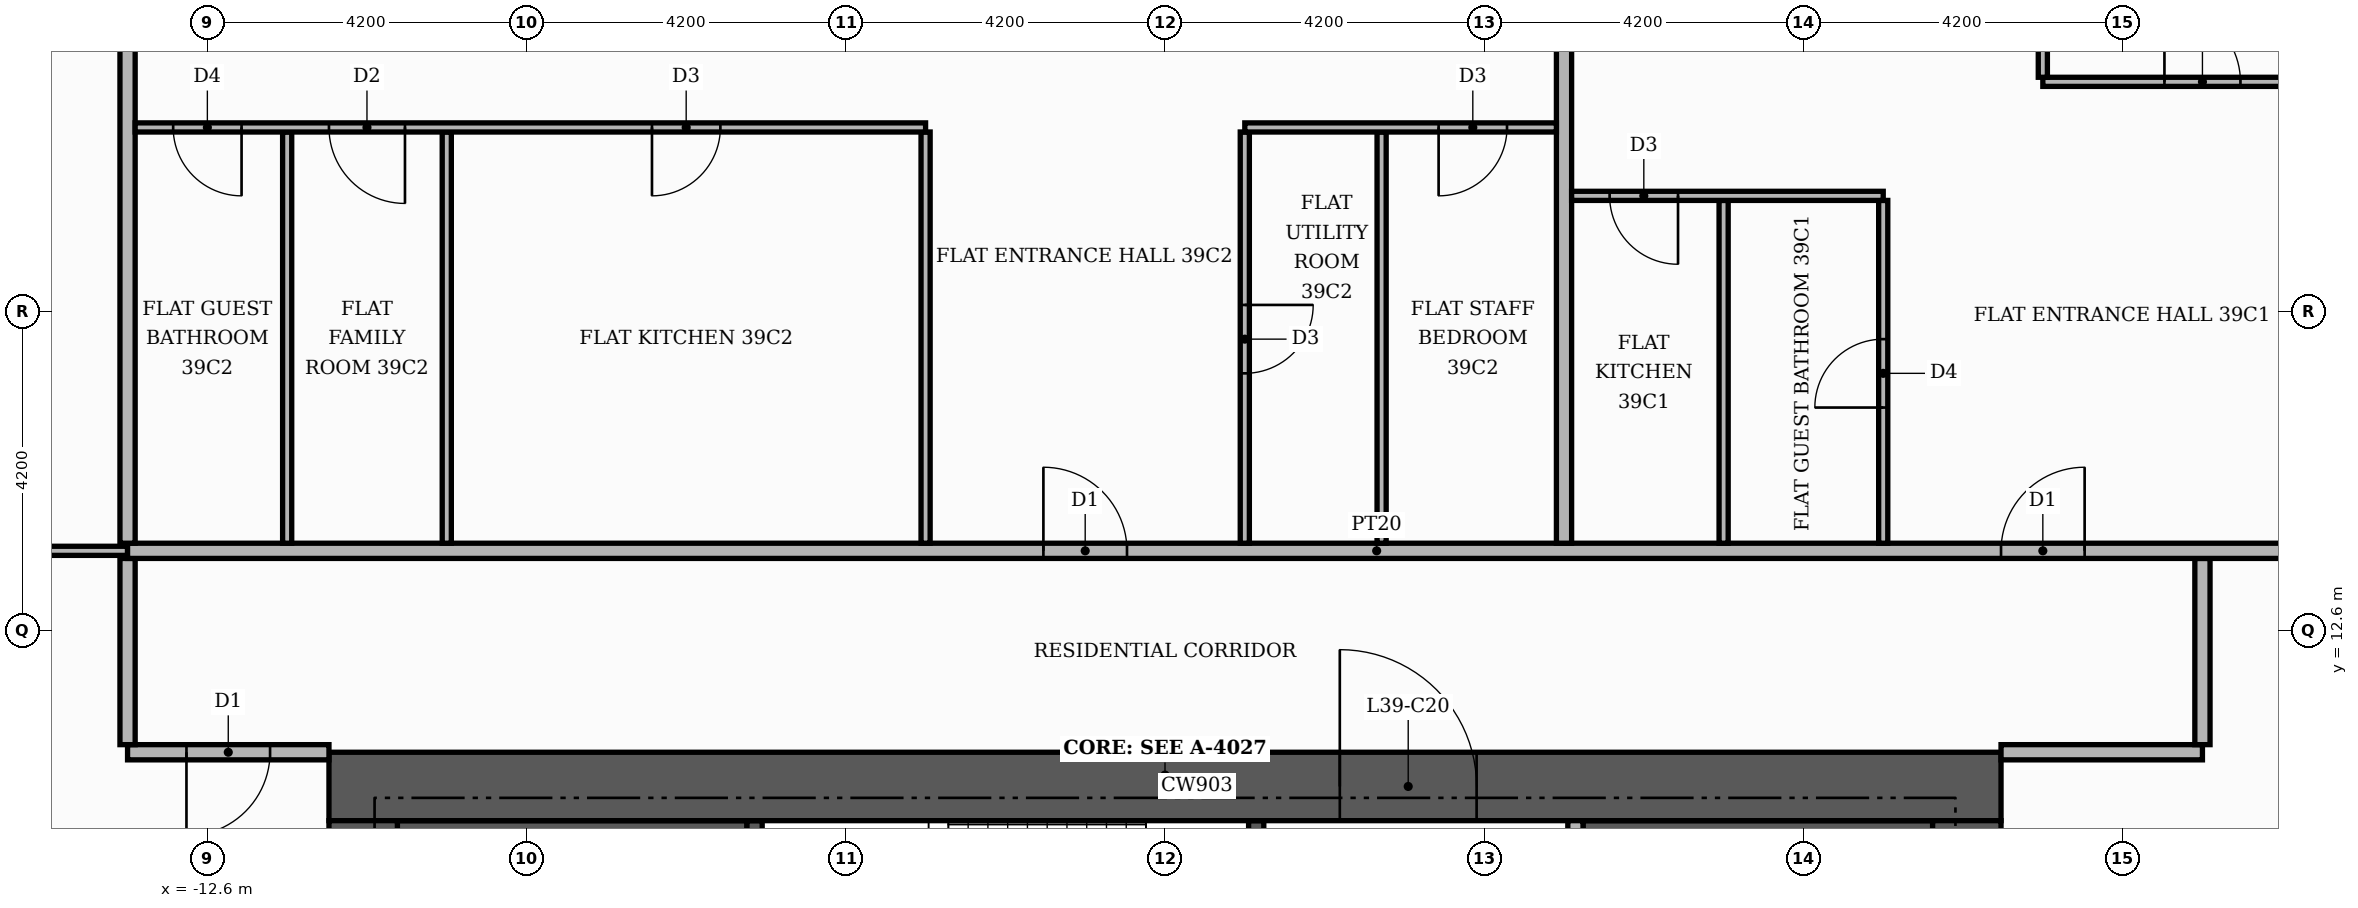
"""IFC4 building model, lengths in metres.
Left out: names, types, materials, properties, quantities, classifications, styles, units other than length and angle.
Written with IfcOpenShell. Run it as: python <this file> out.ifc"""

import sys

from ifc_helpers import new_model, si_unit, direction, frame, frame_2d, origin, place, context, subcontext, project, spatial, rectangle, extrude, element, fill, save


model = new_model("IFC4")
c1 = context("Model", 3, precision=1e-05, world=origin(), true_north=direction((0.0, 1.0)))
c2 = subcontext(c1, "Body", "Model", "MODEL_VIEW")
j1 = project(units=[si_unit("LENGTHUNIT", "METRE"), si_unit("PLANEANGLEUNIT", "RADIAN")], contexts=[c1])
p1 = place(None, origin())
s1 = spatial("IfcSite", under=j1, at=p1, CompositionType="ELEMENT")
p2 = place(p1, origin())
s2 = spatial("IfcBuilding", under=s1, at=p2, CompositionType="ELEMENT")
p3 = place(p2, frame((0.0, 0.0, 165.0)))
s3 = spatial("IfcBuildingStorey", under=s2, at=p3, CompositionType="ELEMENT", Elevation=165.0)
for number, where, z_axis, x_axis in (
    (1, (-10.1, 9.15, 0.0), (0.0, 0.0, 1.0), (1.0, 0.0, 0.0)),
    (2, (5.5, 9.15, 0.0), (0.0, 0.0, 1.0), (1.0, 0.0, 0.0)),
):
    element("IfcWall", number, at=place(p3, frame(where, z_axis=z_axis, x_axis=x_axis)), inside=s3, PredefinedType="SHEAR", context=c2, shape_type="SweptSolid", body=[
        extrude(rectangle(XDim=4.6, YDim=1.9, at=frame_2d((2.3, 0.0))), origin(), (0.0, 0.0, 1.0), 3.48),
    ])
p4 = place(p3, frame((-5.4, 7.25, 0.0), z_axis=(0.0, 0.0, 1.0), x_axis=(0.0, 1.0, 0.0)))
e3 = element("IfcWall", 3, at=p4, inside=s3, PredefinedType="SHEAR", context=c2, shape_type="SweptSolid", body=[
    extrude(rectangle(XDim=2.85, YDim=0.2, at=frame_2d((1.425, 0.0))), origin(), (0.0, 0.0, 1.0), 3.48),
])
p5 = place(p3, frame((1.2, 7.25, 0.0), z_axis=(0.0, 0.0, 1.0), x_axis=(0.0, 1.0, 0.0)))
e4 = element("IfcWall", 4, at=p5, inside=s3, PredefinedType="SHEAR", context=c2, shape_type="SweptSolid", body=[
    extrude(rectangle(XDim=2.85, YDim=0.2, at=frame_2d((1.425, 0.0))), origin(), (0.0, 0.0, 1.0), 3.48),
])
p6 = place(p5, frame((0.85, 0.0, 0.0)))
e5 = element("IfcOpeningElement", 5, at=p6, cuts=e4, PredefinedType="OPENING", context=c2, shape_type="SweptSolid", body=[
    extrude(rectangle(XDim=1.0, YDim=2.1, at=frame_2d((0.5, 1.05))), frame((0.0, 0.11, 0.0), z_axis=(0.0, -1.0, 0.0), x_axis=(1.0, 0.0, 0.0)), (0.0, 0.0, 1.0), 0.22),
])
p7 = place(p3, frame((-11.0, 10.55, 0.0), z_axis=(0.0, 0.0, 1.0), x_axis=(1.0, 0.0, 0.0)))
e6 = element("IfcWall", 6, at=p7, inside=s3, PredefinedType="SHEAR", context=c2, shape_type="SweptSolid", body=[
    extrude(rectangle(XDim=22.0, YDim=0.9, at=frame_2d((11.0, 0.0))), origin(), (0.0, 0.0, 1.0), 3.48),
])
p8 = place(p7, frame((13.3, 0.0, 0.0)))
e7 = element("IfcOpeningElement", 7, at=p8, cuts=e6, PredefinedType="OPENING", context=c2, shape_type="SweptSolid", body=[
    extrude(rectangle(XDim=1.8, YDim=2.2, at=frame_2d((0.9, 1.1))), frame((0.0, 0.46, 0.0), z_axis=(0.0, -1.0, 0.0), x_axis=(1.0, 0.0, 0.0)), (0.0, 0.0, 1.0), 0.92),
])
for number, where, z_axis, x_axis in (
    (8, (-10.55, -10.1, 0.0), (0.0, 0.0, 1.0), (0.0, 1.0, 0.0)),
    (9, (10.55, -10.1, 0.0), (0.0, 0.0, 1.0), (0.0, 1.0, 0.0)),
):
    element("IfcWall", number, at=place(p3, frame(where, z_axis=z_axis, x_axis=x_axis)), inside=s3, PredefinedType="SHEAR", context=c2, shape_type="SweptSolid", body=[
        extrude(rectangle(XDim=20.2, YDim=0.9, at=frame_2d((10.1, 0.0))), origin(), (0.0, 0.0, 1.0), 3.48),
    ])
p9 = place(p3, frame((5.4, 5.5, 0.0), z_axis=(0.0, 0.0, 1.0), x_axis=(0.0, 1.0, 0.0)))
e10 = element("IfcWall", 10, at=p9, inside=s3, PredefinedType="PARTITIONING", context=c2, shape_type="SweptSolid", body=[
    extrude(rectangle(XDim=4.6, YDim=0.2, at=frame_2d((2.3, 0.0))), origin(), (0.0, 0.0, 1.0), 3.48),
])
p10 = place(p9, frame((0.25, 0.0, 0.0)))
e11 = element("IfcOpeningElement", 11, at=p10, cuts=e10, PredefinedType="OPENING", context=c2, shape_type="SweptSolid", body=[
    extrude(rectangle(XDim=1.0, YDim=2.1, at=frame_2d((0.5, 1.05))), frame((0.0, 0.11, 0.0), z_axis=(0.0, -1.0, 0.0), x_axis=(1.0, 0.0, 0.0)), (0.0, 0.0, 1.0), 0.22),
])
p11 = place(p3, frame((-13.65, 11.0, 0.0), z_axis=(0.0, 0.0, 1.0), x_axis=(1.0, 0.0, 0.0)))
e12 = element("IfcWall", 12, at=p11, inside=s3, PredefinedType="PARTITIONING", context=c2, shape_type="SweptSolid", body=[
    extrude(rectangle(XDim=2.65, YDim=0.2, at=frame_2d((1.325, 0.0))), origin(), (0.0, 0.0, 1.0), 3.48),
])
p12 = place(p11, frame((0.775, 0.0, 0.0)))
e13 = element("IfcOpeningElement", 13, at=p12, cuts=e12, PredefinedType="OPENING", context=c2, shape_type="SweptSolid", body=[
    extrude(rectangle(XDim=1.1, YDim=2.4, at=frame_2d((0.55, 1.2))), frame((0.0, 0.11, 0.0), z_axis=(0.0, -1.0, 0.0), x_axis=(1.0, 0.0, 0.0)), (0.0, 0.0, 1.0), 0.22),
])
p13 = place(p3, frame((11.0, 11.0, 0.0), z_axis=(0.0, 0.0, 1.0), x_axis=(1.0, 0.0, 0.0)))
e14 = element("IfcWall", 14, at=p13, inside=s3, PredefinedType="PARTITIONING", context=c2, shape_type="SweptSolid", body=[
    extrude(rectangle(XDim=2.65, YDim=0.2, at=frame_2d((1.325, 0.0))), origin(), (0.0, 0.0, 1.0), 3.48),
])
for number, where, z_axis, x_axis in (
    (15, (-13.65, 11.1, 0.0), (0.0, 0.0, 1.0), (0.0, 1.0, 0.0)),
    (16, (13.65, 11.1, 0.0), (0.0, 0.0, 1.0), (0.0, 1.0, 0.0)),
):
    element("IfcWall", number, at=place(p3, frame(where, z_axis=z_axis, x_axis=x_axis)), inside=s3, PredefinedType="PARTITIONING", context=c2, shape_type="SweptSolid", body=[
        extrude(rectangle(XDim=2.45, YDim=0.2, at=frame_2d((1.225, 0.0))), origin(), (0.0, 0.0, 1.0), 3.48),
    ])
p14 = place(p3, frame((-19.82, 13.65, 0.0), z_axis=(0.0, 0.0, 1.0), x_axis=(1.0, 0.0, 0.0)))
e17 = element("IfcWall", 17, at=p14, inside=s3, PredefinedType="PARTITIONING", context=c2, shape_type="SweptSolid", body=[
    extrude(rectangle(XDim=6.17, YDim=0.12, at=frame_2d((3.085, 0.0))), origin(), (0.0, 0.0, 1.0), 3.48),
])
p15 = place(p14, frame((2.635, 0.0, 0.0)))
e18 = element("IfcOpeningElement", 18, at=p15, cuts=e17, PredefinedType="OPENING", context=c2, shape_type="SweptSolid", body=[
    extrude(rectangle(XDim=0.9, YDim=2.1, at=frame_2d((0.45, 1.05))), frame((0.0, 0.07, 0.0), z_axis=(0.0, -1.0, 0.0), x_axis=(1.0, 0.0, 0.0)), (0.0, 0.0, 1.0), 0.14),
])
p16 = place(p3, frame((-13.65, 13.65, 0.0), z_axis=(0.0, 0.0, 1.0), x_axis=(1.0, 0.0, 0.0)))
e19 = element("IfcWall", 19, at=p16, inside=s3, PredefinedType="PARTITIONING", context=c2, shape_type="SweptSolid", body=[
    extrude(rectangle(XDim=32.87, YDim=0.2, at=frame_2d((16.435, 0.0))), origin(), (0.0, 0.0, 1.0), 3.48),
])
p17 = place(p16, frame((24.65, 0.0, 0.0)))
e20 = element("IfcOpeningElement", 20, at=p17, cuts=e19, PredefinedType="OPENING", context=c2, shape_type="SweptSolid", body=[
    extrude(rectangle(XDim=1.1, YDim=2.4, at=frame_2d((0.55, 1.2))), frame((0.0, 0.11, 0.0), z_axis=(0.0, -1.0, 0.0), x_axis=(1.0, 0.0, 0.0)), (0.0, 0.0, 1.0), 0.22),
])
p18 = place(p16, frame((12.05, 0.0, 0.0)))
e21 = element("IfcOpeningElement", 21, at=p18, cuts=e19, PredefinedType="OPENING", context=c2, shape_type="SweptSolid", body=[
    extrude(rectangle(XDim=1.1, YDim=2.4, at=frame_2d((0.55, 1.2))), frame((0.0, 0.11, 0.0), z_axis=(0.0, -1.0, 0.0), x_axis=(1.0, 0.0, 0.0)), (0.0, 0.0, 1.0), 0.22),
])
p19 = place(p3, frame((-13.65, 13.75, 0.0), z_axis=(0.0, 0.0, 1.0), x_axis=(0.0, 1.0, 0.0)))
e22 = element("IfcWall", 22, at=p19, inside=s3, PredefinedType="PARTITIONING", context=c2, shape_type="SweptSolid", body=[
    extrude(rectangle(XDim=11.67, YDim=0.2, at=frame_2d((5.835, 0.0))), origin(), (0.0, 0.0, 1.0), 3.48),
])
for number, where, z_axis, x_axis in (
    (23, (-11.55, 13.75, 0.0), (0.0, 0.0, 1.0), (0.0, 1.0, 0.0)),
    (24, (-9.45, 13.75, 0.0), (0.0, 0.0, 1.0), (0.0, 1.0, 0.0)),
    (25, (-3.15, 13.75, 0.0), (0.0, 0.0, 1.0), (0.0, 1.0, 0.0)),
):
    element("IfcWall", number, at=place(p3, frame(where, z_axis=z_axis, x_axis=x_axis)), inside=s3, PredefinedType="PARTITIONING", context=c2, shape_type="SweptSolid", body=[
        extrude(rectangle(XDim=5.41, YDim=0.12, at=frame_2d((2.705, 0.0))), origin(), (0.0, 0.0, 1.0), 3.48),
    ])
p20 = place(p3, frame((1.05, 13.75, 0.0), z_axis=(0.0, 0.0, 1.0), x_axis=(0.0, 1.0, 0.0)))
e26 = element("IfcWall", 26, at=p20, inside=s3, PredefinedType="PARTITIONING", context=c2, shape_type="SweptSolid", body=[
    extrude(rectangle(XDim=5.41, YDim=0.12, at=frame_2d((2.705, 0.0))), origin(), (0.0, 0.0, 1.0), 3.48),
])
p21 = place(p20, frame((2.235, 0.0, 0.0)))
e27 = element("IfcOpeningElement", 27, at=p21, cuts=e26, PredefinedType="OPENING", context=c2, shape_type="SweptSolid", body=[
    extrude(rectangle(XDim=0.9, YDim=2.1, at=frame_2d((0.45, 1.05))), frame((0.0, 0.07, 0.0), z_axis=(0.0, -1.0, 0.0), x_axis=(1.0, 0.0, 0.0)), (0.0, 0.0, 1.0), 0.14),
])
p22 = place(p3, frame((2.85, 13.75, 0.0), z_axis=(0.0, 0.0, 1.0), x_axis=(0.0, 1.0, 0.0)))
e28 = element("IfcWall", 28, at=p22, inside=s3, PredefinedType="PARTITIONING", context=c2, shape_type="SweptSolid", body=[
    extrude(rectangle(XDim=5.41, YDim=0.12, at=frame_2d((2.705, 0.0))), origin(), (0.0, 0.0, 1.0), 3.48),
])
p23 = place(p3, frame((5.25, 13.75, 0.0), z_axis=(0.0, 0.0, 1.0), x_axis=(0.0, 1.0, 0.0)))
e29 = element("IfcWall", 29, at=p23, inside=s3, PredefinedType="PARTITIONING", context=c2, shape_type="SweptSolid", body=[
    extrude(rectangle(XDim=6.67, YDim=0.2, at=frame_2d((3.335, 0.0))), origin(), (0.0, 0.0, 1.0), 3.48),
])
p24 = place(p3, frame((7.35, 13.75, 0.0), z_axis=(0.0, 0.0, 1.0), x_axis=(0.0, 1.0, 0.0)))
e30 = element("IfcWall", 30, at=p24, inside=s3, PredefinedType="PARTITIONING", context=c2, shape_type="SweptSolid", body=[
    extrude(rectangle(XDim=4.51, YDim=0.12, at=frame_2d((2.255, 0.0))), origin(), (0.0, 0.0, 1.0), 3.48),
])
p25 = place(p3, frame((9.45, 13.75, 0.0), z_axis=(0.0, 0.0, 1.0), x_axis=(0.0, 1.0, 0.0)))
e31 = element("IfcWall", 31, at=p25, inside=s3, PredefinedType="PARTITIONING", context=c2, shape_type="SweptSolid", body=[
    extrude(rectangle(XDim=4.51, YDim=0.12, at=frame_2d((2.255, 0.0))), origin(), (0.0, 0.0, 1.0), 3.48),
])
p26 = place(p25, frame((1.785, 0.0, 0.0)))
e32 = element("IfcOpeningElement", 32, at=p26, cuts=e31, PredefinedType="OPENING", context=c2, shape_type="SweptSolid", body=[
    extrude(rectangle(XDim=0.9, YDim=2.1, at=frame_2d((0.45, 1.05))), frame((0.0, 0.07, 0.0), z_axis=(0.0, -1.0, 0.0), x_axis=(1.0, 0.0, 0.0)), (0.0, 0.0, 1.0), 0.14),
])
p27 = place(p3, frame((5.35, 18.32, 0.0), z_axis=(0.0, 0.0, 1.0), x_axis=(1.0, 0.0, 0.0)))
e33 = element("IfcWall", 33, at=p27, inside=s3, PredefinedType="PARTITIONING", context=c2, shape_type="SweptSolid", body=[
    extrude(rectangle(XDim=4.1, YDim=0.12, at=frame_2d((2.05, 0.0))), origin(), (0.0, 0.0, 1.0), 3.48),
])
p28 = place(p27, frame((0.5, 0.0, 0.0)))
e34 = element("IfcOpeningElement", 34, at=p28, cuts=e33, PredefinedType="OPENING", context=c2, shape_type="SweptSolid", body=[
    extrude(rectangle(XDim=0.9, YDim=2.1, at=frame_2d((0.45, 1.05))), frame((0.0, 0.07, 0.0), z_axis=(0.0, -1.0, 0.0), x_axis=(1.0, 0.0, 0.0)), (0.0, 0.0, 1.0), 0.14),
])
p29 = place(p3, frame((-13.55, 19.22, 0.0), z_axis=(0.0, 0.0, 1.0), x_axis=(1.0, 0.0, 0.0)))
e35 = element("IfcWall", 35, at=p29, inside=s3, PredefinedType="PARTITIONING", context=c2, shape_type="SweptSolid", body=[
    extrude(rectangle(XDim=10.4, YDim=0.12, at=frame_2d((5.2, 0.0))), origin(), (0.0, 0.0, 1.0), 3.48),
])
p30 = place(p29, frame((6.8, 0.0, 0.0)))
e36 = element("IfcOpeningElement", 36, at=p30, cuts=e35, PredefinedType="OPENING", context=c2, shape_type="SweptSolid", body=[
    extrude(rectangle(XDim=0.9, YDim=2.1, at=frame_2d((0.45, 1.05))), frame((0.0, 0.07, 0.0), z_axis=(0.0, -1.0, 0.0), x_axis=(1.0, 0.0, 0.0)), (0.0, 0.0, 1.0), 0.14),
])
p31 = place(p29, frame((2.55, 0.0, 0.0)))
e37 = element("IfcOpeningElement", 37, at=p31, cuts=e35, PredefinedType="OPENING", context=c2, shape_type="SweptSolid", body=[
    extrude(rectangle(XDim=1.0, YDim=2.1, at=frame_2d((0.5, 1.05))), frame((0.0, 0.07, 0.0), z_axis=(0.0, -1.0, 0.0), x_axis=(1.0, 0.0, 0.0)), (0.0, 0.0, 1.0), 0.14),
])
p32 = place(p29, frame((0.5, 0.0, 0.0)))
e38 = element("IfcOpeningElement", 38, at=p32, cuts=e35, PredefinedType="OPENING", context=c2, shape_type="SweptSolid", body=[
    extrude(rectangle(XDim=0.9, YDim=2.1, at=frame_2d((0.45, 1.05))), frame((0.0, 0.07, 0.0), z_axis=(0.0, -1.0, 0.0), x_axis=(1.0, 0.0, 0.0)), (0.0, 0.0, 1.0), 0.14),
])
p33 = place(p3, frame((1.05, 19.22, 0.0), z_axis=(0.0, 0.0, 1.0), x_axis=(1.0, 0.0, 0.0)))
e39 = element("IfcWall", 39, at=p33, inside=s3, PredefinedType="PARTITIONING", context=c2, shape_type="SweptSolid", body=[
    extrude(rectangle(XDim=4.1, YDim=0.12, at=frame_2d((2.05, 0.0))), origin(), (0.0, 0.0, 1.0), 3.48),
])
p34 = place(p33, frame((2.55, 0.0, 0.0)))
e40 = element("IfcOpeningElement", 40, at=p34, cuts=e39, PredefinedType="OPENING", context=c2, shape_type="SweptSolid", body=[
    extrude(rectangle(XDim=0.9, YDim=2.1, at=frame_2d((0.45, 1.05))), frame((0.0, 0.07, 0.0), z_axis=(0.0, -1.0, 0.0), x_axis=(1.0, 0.0, 0.0)), (0.0, 0.0, 1.0), 0.14),
])
p35 = place(p3, frame((11.55, 19.82, 0.0), z_axis=(0.0, 0.0, 1.0), x_axis=(1.0, 0.0, 0.0)))
e41 = element("IfcWall", 41, at=p35, inside=s3, PredefinedType="PARTITIONING", context=c2, shape_type="SweptSolid", body=[
    extrude(rectangle(XDim=5.95, YDim=0.12, at=frame_2d((2.975, 0.0))), origin(), (0.0, 0.0, 1.0), 3.48),
])
p36 = place(p35, frame((1.6, 0.0, 0.0)))
e42 = element("IfcOpeningElement", 42, at=p36, cuts=e41, PredefinedType="OPENING", context=c2, shape_type="SweptSolid", body=[
    extrude(rectangle(XDim=1.0, YDim=2.1, at=frame_2d((0.5, 1.05))), frame((0.0, 0.07, 0.0), z_axis=(0.0, -1.0, 0.0), x_axis=(1.0, 0.0, 0.0)), (0.0, 0.0, 1.0), 0.14),
])
p37 = place(p3, frame((11.55, 19.88, 0.0), z_axis=(0.0, 0.0, 1.0), x_axis=(0.0, 1.0, 0.0)))
e43 = element("IfcWall", 43, at=p37, inside=s3, PredefinedType="PARTITIONING", context=c2, shape_type="SweptSolid", body=[
    extrude(rectangle(XDim=0.54, YDim=0.12, at=frame_2d((0.27, 0.0))), origin(), (0.0, 0.0, 1.0), 3.48),
])
p38 = place(p8, origin())
e44 = element("IfcDoor", 44, at=p38, inside=s3, OperationType="DOUBLE_DOOR_SINGLE_SWING", PredefinedType="DOOR", context=c2, shape_type="SweptSolid", body=[
    extrude(rectangle(XDim=1.8, YDim=2.2, at=frame_2d((0.9, 1.1))), frame((0.0, 0.025, 0.0), z_axis=(0.0, -1.0, 0.0), x_axis=(1.0, 0.0, 0.0)), (0.0, 0.0, 1.0), 0.05),
])
fill(e7, e44)
p39 = place(p17, origin())
e45 = element("IfcDoor", 45, at=p39, inside=s3, OperationType="SINGLE_SWING_RIGHT", PredefinedType="DOOR", context=c2, shape_type="SweptSolid", body=[
    extrude(rectangle(XDim=1.1, YDim=2.4, at=frame_2d((0.55, 1.2))), frame((0.0, 0.025, 0.0), z_axis=(0.0, -1.0, 0.0), x_axis=(1.0, 0.0, 0.0)), (0.0, 0.0, 1.0), 0.05),
])
fill(e20, e45)
p40 = place(p26, origin())
e46 = element("IfcDoor", 46, at=p40, inside=s3, OperationType="SINGLE_SWING_LEFT", PredefinedType="DOOR", context=c2, shape_type="SweptSolid", body=[
    extrude(rectangle(XDim=0.9, YDim=2.1, at=frame_2d((0.45, 1.05))), frame((0.0, 0.025, 0.0), z_axis=(0.0, -1.0, 0.0), x_axis=(1.0, 0.0, 0.0)), (0.0, 0.0, 1.0), 0.05),
])
fill(e32, e46)
p41 = place(p28, frame((0.9, 0.0, 0.0), z_axis=(0.0, 0.0, 1.0), x_axis=(-1.0, 0.0, 0.0)))
e47 = element("IfcDoor", 47, at=p41, inside=s3, OperationType="SINGLE_SWING_RIGHT", PredefinedType="DOOR", context=c2, shape_type="SweptSolid", body=[
    extrude(rectangle(XDim=0.9, YDim=2.1, at=frame_2d((0.45, 1.05))), frame((0.0, 0.025, 0.0), z_axis=(0.0, -1.0, 0.0), x_axis=(1.0, 0.0, 0.0)), (0.0, 0.0, 1.0), 0.05),
])
fill(e34, e47)
p42 = place(p36, origin())
e48 = element("IfcDoor", 48, at=p42, inside=s3, OperationType="SINGLE_SWING_LEFT", PredefinedType="DOOR", context=c2, shape_type="SweptSolid", body=[
    extrude(rectangle(XDim=1.0, YDim=2.1, at=frame_2d((0.5, 1.05))), frame((0.0, 0.025, 0.0), z_axis=(0.0, -1.0, 0.0), x_axis=(1.0, 0.0, 0.0)), (0.0, 0.0, 1.0), 0.05),
])
fill(e42, e48)
p43 = place(p18, origin())
e49 = element("IfcDoor", 49, at=p43, inside=s3, OperationType="SINGLE_SWING_LEFT", PredefinedType="DOOR", context=c2, shape_type="SweptSolid", body=[
    extrude(rectangle(XDim=1.1, YDim=2.4, at=frame_2d((0.55, 1.2))), frame((0.0, 0.025, 0.0), z_axis=(0.0, -1.0, 0.0), x_axis=(1.0, 0.0, 0.0)), (0.0, 0.0, 1.0), 0.05),
])
fill(e21, e49)
p44 = place(p34, frame((0.9, 0.0, 0.0), z_axis=(0.0, 0.0, 1.0), x_axis=(-1.0, 0.0, 0.0)))
e50 = element("IfcDoor", 50, at=p44, inside=s3, OperationType="SINGLE_SWING_LEFT", PredefinedType="DOOR", context=c2, shape_type="SweptSolid", body=[
    extrude(rectangle(XDim=0.9, YDim=2.1, at=frame_2d((0.45, 1.05))), frame((0.0, 0.025, 0.0), z_axis=(0.0, -1.0, 0.0), x_axis=(1.0, 0.0, 0.0)), (0.0, 0.0, 1.0), 0.05),
])
fill(e40, e50)
p45 = place(p21, frame((0.9, 0.0, 0.0), z_axis=(0.0, 0.0, 1.0), x_axis=(-1.0, 0.0, 0.0)))
e51 = element("IfcDoor", 51, at=p45, inside=s3, OperationType="SINGLE_SWING_RIGHT", PredefinedType="DOOR", context=c2, shape_type="SweptSolid", body=[
    extrude(rectangle(XDim=0.9, YDim=2.1, at=frame_2d((0.45, 1.05))), frame((0.0, 0.025, 0.0), z_axis=(0.0, -1.0, 0.0), x_axis=(1.0, 0.0, 0.0)), (0.0, 0.0, 1.0), 0.05),
])
fill(e27, e51)
p46 = place(p30, frame((0.9, 0.0, 0.0), z_axis=(0.0, 0.0, 1.0), x_axis=(-1.0, 0.0, 0.0)))
e52 = element("IfcDoor", 52, at=p46, inside=s3, OperationType="SINGLE_SWING_LEFT", PredefinedType="DOOR", context=c2, shape_type="SweptSolid", body=[
    extrude(rectangle(XDim=0.9, YDim=2.1, at=frame_2d((0.45, 1.05))), frame((0.0, 0.025, 0.0), z_axis=(0.0, -1.0, 0.0), x_axis=(1.0, 0.0, 0.0)), (0.0, 0.0, 1.0), 0.05),
])
fill(e36, e52)
p47 = place(p31, frame((1.0, 0.0, 0.0), z_axis=(0.0, 0.0, 1.0), x_axis=(-1.0, 0.0, 0.0)))
e53 = element("IfcDoor", 53, at=p47, inside=s3, OperationType="SINGLE_SWING_RIGHT", PredefinedType="DOOR", context=c2, shape_type="SweptSolid", body=[
    extrude(rectangle(XDim=1.0, YDim=2.1, at=frame_2d((0.5, 1.05))), frame((0.0, 0.025, 0.0), z_axis=(0.0, -1.0, 0.0), x_axis=(1.0, 0.0, 0.0)), (0.0, 0.0, 1.0), 0.05),
])
fill(e37, e53)
p48 = place(p32, frame((0.9, 0.0, 0.0), z_axis=(0.0, 0.0, 1.0), x_axis=(-1.0, 0.0, 0.0)))
e54 = element("IfcDoor", 54, at=p48, inside=s3, OperationType="SINGLE_SWING_RIGHT", PredefinedType="DOOR", context=c2, shape_type="SweptSolid", body=[
    extrude(rectangle(XDim=0.9, YDim=2.1, at=frame_2d((0.45, 1.05))), frame((0.0, 0.025, 0.0), z_axis=(0.0, -1.0, 0.0), x_axis=(1.0, 0.0, 0.0)), (0.0, 0.0, 1.0), 0.05),
])
fill(e38, e54)
p49 = place(p12, frame((1.1, 0.0, 0.0), z_axis=(0.0, 0.0, 1.0), x_axis=(-1.0, 0.0, 0.0)))
e55 = element("IfcDoor", 55, at=p49, inside=s3, OperationType="SINGLE_SWING_LEFT", PredefinedType="DOOR", context=c2, shape_type="SweptSolid", body=[
    extrude(rectangle(XDim=1.1, YDim=2.4, at=frame_2d((0.55, 1.2))), frame((0.0, 0.025, 0.0), z_axis=(0.0, -1.0, 0.0), x_axis=(1.0, 0.0, 0.0)), (0.0, 0.0, 1.0), 0.05),
])
fill(e13, e55)
save(model, sys.argv[1])
